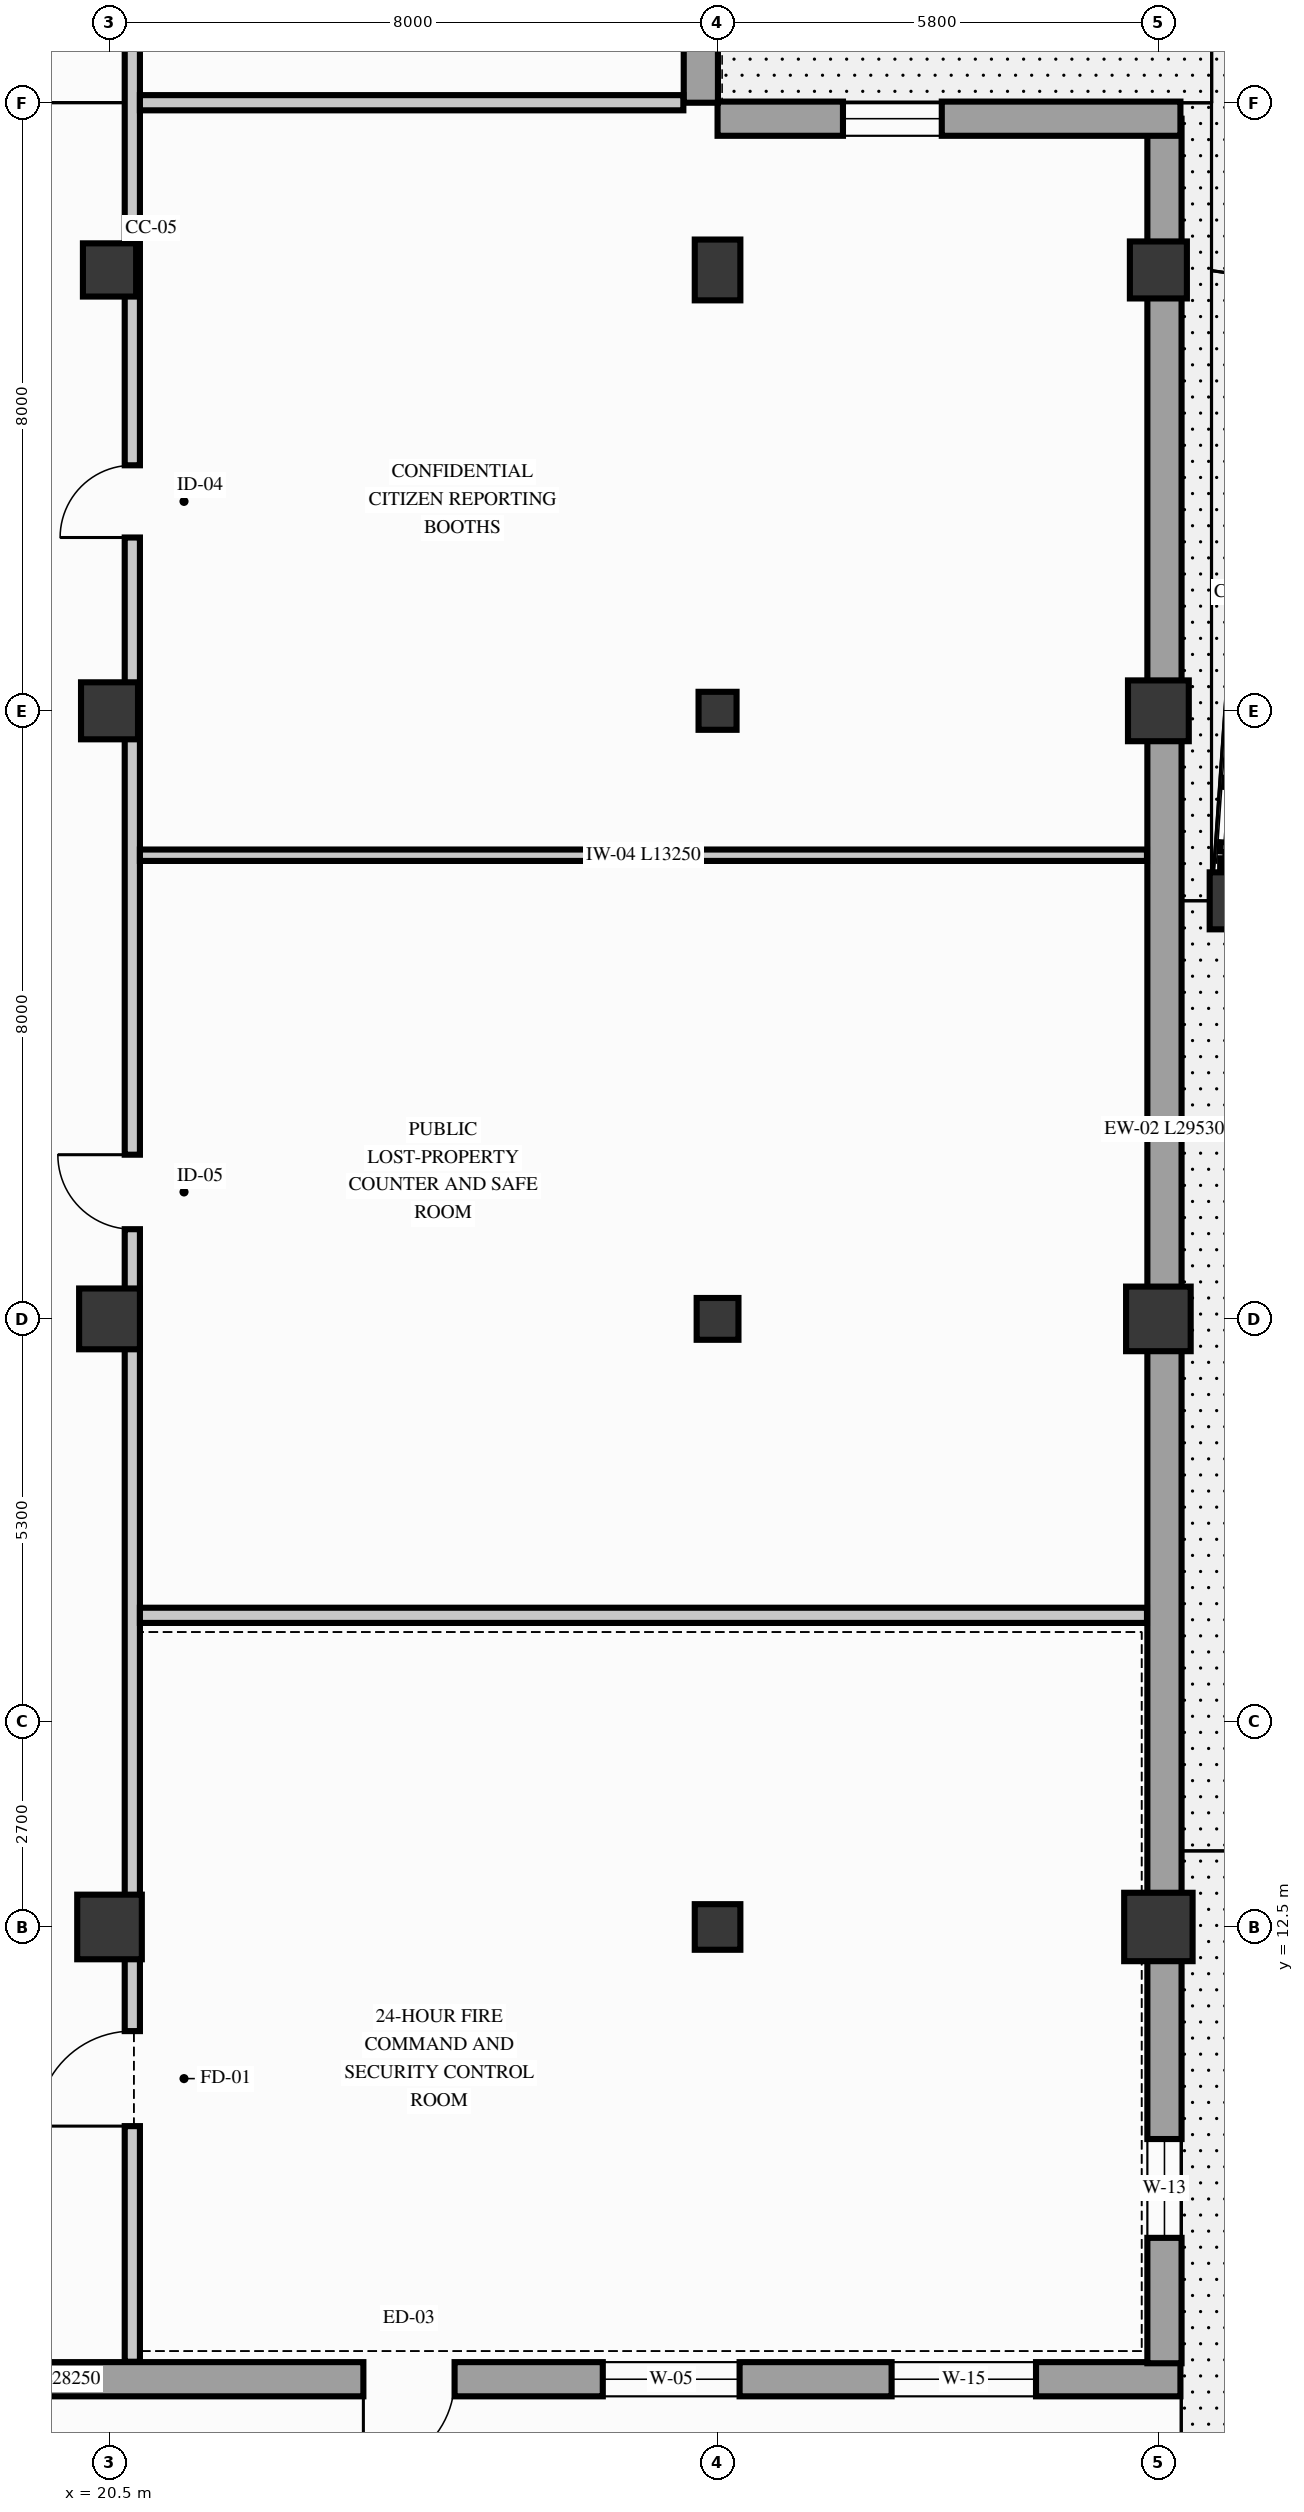
"""IFC4 building model, lengths in metres.
Left out: names, types, materials, properties, quantities, classifications, styles, units other than length and angle.
Written with IfcOpenShell. Run it as: python <this file> out.ifc"""

import sys

from ifc_helpers import new_model, si_unit, direction, frame, frame_2d, origin, origin_2d, place, context, subcontext, project, spatial, rectangle, extrude, element, fill, save


model = new_model("IFC4")
c1 = context("Model", 3, precision=1e-05, world=origin(), true_north=direction((0.0, 1.0)))
c2 = subcontext(c1, "Body", "Model", "MODEL_VIEW")
j1 = project(units=[si_unit("LENGTHUNIT", "METRE"), si_unit("PLANEANGLEUNIT", "RADIAN")], contexts=[c1])
p1 = place(None, origin())
s1 = spatial("IfcSite", under=j1, at=p1, CompositionType="ELEMENT")
p2 = place(p1, origin())
s2 = spatial("IfcBuilding", under=s1, at=p2, CompositionType="ELEMENT")
p3 = place(p2, origin())
s3 = spatial("IfcBuildingStorey", under=s2, at=p3, CompositionType="ELEMENT", Elevation=0.0)
p4 = place(p3, frame((35.35, 26.0, 0.0), z_axis=(0.0, 0.0, 1.0), x_axis=(0.0, 1.0, 0.0)))
e1 = element("IfcColumn", 1, at=p4, inside=s3, PredefinedType="COLUMN", context=c2, shape_type="SweptSolid", body=[
    extrude(rectangle(XDim=0.75, YDim=0.75, at=origin_2d()), origin(), (0.0, 0.0, 1.0), 5.1),
])
p5 = place(p3, frame((20.5, 12.5, 0.0), z_axis=(0.0, 0.0, 1.0), x_axis=(1.0, 0.0, 0.0)))
e2 = element("IfcColumn", 2, at=p5, inside=s3, PredefinedType="COLUMN", context=c2, shape_type="SweptSolid", body=[
    extrude(rectangle(XDim=0.85, YDim=0.85, at=origin_2d()), origin(), (0.0, 0.0, 1.0), 5.1),
])
p6 = place(p3, frame((20.5, 20.5, 0.0), z_axis=(0.0, 0.0, 1.0), x_axis=(1.0, 0.0, 0.0)))
e3 = element("IfcColumn", 3, at=p6, inside=s3, PredefinedType="COLUMN", context=c2, shape_type="SweptSolid", body=[
    extrude(rectangle(XDim=0.8, YDim=0.8, at=origin_2d()), origin(), (0.0, 0.0, 1.0), 5.1),
])
p7 = place(p3, frame((20.5, 28.5, 0.0), z_axis=(0.0, 0.0, 1.0), x_axis=(1.0, 0.0, 0.0)))
e4 = element("IfcColumn", 4, at=p7, inside=s3, PredefinedType="COLUMN", context=c2, shape_type="SweptSolid", body=[
    extrude(rectangle(XDim=0.75, YDim=0.75, at=origin_2d()), origin(), (0.0, 0.0, 1.0), 5.1),
])
p8 = place(p3, frame((20.5, 34.3, 0.0), z_axis=(0.0, 0.0, 1.0), x_axis=(1.0, 0.0, 0.0)))
e5 = element("IfcColumn", 5, at=p8, inside=s3, PredefinedType="COLUMN", context=c2, shape_type="SweptSolid", body=[
    extrude(rectangle(XDim=0.7, YDim=0.7, at=origin_2d()), origin(), (0.0, 0.0, 1.0), 5.1),
])
p9 = place(p3, frame((28.5, 12.5, 0.0), z_axis=(0.0, 0.0, 1.0), x_axis=(1.0, 0.0, 0.0)))
e6 = element("IfcColumn", 6, at=p9, inside=s3, PredefinedType="COLUMN", context=c2, shape_type="SweptSolid", body=[
    extrude(rectangle(XDim=0.6, YDim=0.6, at=origin_2d()), origin(), (0.0, 0.0, 1.0), 5.1),
])
p10 = place(p3, frame((28.5, 20.5, 0.0), z_axis=(0.0, 0.0, 1.0), x_axis=(1.0, 0.0, 0.0)))
e7 = element("IfcColumn", 7, at=p10, inside=s3, PredefinedType="COLUMN", context=c2, shape_type="SweptSolid", body=[
    extrude(rectangle(XDim=0.55, YDim=0.55, at=origin_2d()), origin(), (0.0, 0.0, 1.0), 5.1),
])
p11 = place(p3, frame((28.5, 28.5, 0.0), z_axis=(0.0, 0.0, 1.0), x_axis=(1.0, 0.0, 0.0)))
e8 = element("IfcColumn", 8, at=p11, inside=s3, PredefinedType="COLUMN", context=c2, shape_type="SweptSolid", body=[
    extrude(rectangle(XDim=0.5, YDim=0.5, at=origin_2d()), origin(), (0.0, 0.0, 1.0), 5.1),
])
p12 = place(p3, frame((28.5, 34.3, 0.0), z_axis=(0.0, 0.0, 1.0), x_axis=(1.0, 0.0, 0.0)))
e9 = element("IfcColumn", 9, at=p12, inside=s3, PredefinedType="COLUMN", context=c2, shape_type="SweptSolid", body=[
    extrude(rectangle(XDim=0.6, YDim=0.8, at=origin_2d()), origin(), (0.0, 0.0, 1.0), 5.1),
])
p13 = place(p3, frame((34.3, 12.5, 0.0), z_axis=(0.0, 0.0, 1.0), x_axis=(1.0, 0.0, 0.0)))
e10 = element("IfcColumn", 10, at=p13, inside=s3, PredefinedType="COLUMN", context=c2, shape_type="SweptSolid", body=[
    extrude(rectangle(XDim=0.9, YDim=0.9, at=origin_2d()), origin(), (0.0, 0.0, 1.0), 5.1),
])
p14 = place(p3, frame((34.3, 20.5, 0.0), z_axis=(0.0, 0.0, 1.0), x_axis=(1.0, 0.0, 0.0)))
e11 = element("IfcColumn", 11, at=p14, inside=s3, PredefinedType="COLUMN", context=c2, shape_type="SweptSolid", body=[
    extrude(rectangle(XDim=0.85, YDim=0.85, at=origin_2d()), origin(), (0.0, 0.0, 1.0), 5.1),
])
p15 = place(p3, frame((34.3, 28.5, 0.0), z_axis=(0.0, 0.0, 1.0), x_axis=(1.0, 0.0, 0.0)))
e12 = element("IfcColumn", 12, at=p15, inside=s3, PredefinedType="COLUMN", context=c2, shape_type="SweptSolid", body=[
    extrude(rectangle(XDim=0.8, YDim=0.8, at=origin_2d()), origin(), (0.0, 0.0, 1.0), 5.1),
])
p16 = place(p3, frame((34.3, 34.3, 0.0), z_axis=(0.0, 0.0, 1.0), x_axis=(1.0, 0.0, 0.0)))
e13 = element("IfcColumn", 13, at=p16, inside=s3, PredefinedType="COLUMN", context=c2, shape_type="SweptSolid", body=[
    extrude(rectangle(XDim=0.75, YDim=0.75, at=origin_2d()), origin(), (0.0, 0.0, 1.0), 5.1),
])
p17 = place(p3, frame((6.34, 6.55, 0.0), z_axis=(0.0, 0.0, 1.0), x_axis=(1.0, 0.0, 0.0)))
e14 = element("IfcWall", 14, at=p17, inside=s3, PredefinedType="SOLIDWALL", context=c2, shape_type="SweptSolid", body=[
    extrude(rectangle(XDim=28.25, YDim=0.45, at=frame_2d((14.125, 0.0))), origin(), (0.0, 0.0, 1.0), 4.428),
])
p18 = place(p17, frame((9.0, 0.0, 0.0), z_axis=(0.0, 0.0, 1.0), x_axis=(-1.0, 0.0, 0.0)))
e15 = element("IfcOpeningElement", 15, at=p18, cuts=e14, PredefinedType="OPENING", context=c2, shape_type="SweptSolid", body=[
    extrude(rectangle(XDim=2.0, YDim=2.5, at=frame_2d((1.0, 1.25))), frame((0.0, 0.235, 0.0), z_axis=(0.0, -1.0, 0.0), x_axis=(1.0, 0.0, 0.0)), (0.0, 0.0, 1.0), 0.47),
])
p19 = place(p17, frame((18.7, 0.0, 0.0), z_axis=(0.0, 0.0, 1.0), x_axis=(-1.0, 0.0, 0.0)))
e16 = element("IfcOpeningElement", 16, at=p19, cuts=e14, PredefinedType="OPENING", context=c2, shape_type="SweptSolid", body=[
    extrude(rectangle(XDim=1.2, YDim=2.3, at=frame_2d((0.6, 1.15))), frame((0.0, 0.235, 0.0), z_axis=(0.0, -1.0, 0.0), x_axis=(1.0, 0.0, 0.0)), (0.0, 0.0, 1.0), 0.47),
])
p20 = place(p17, frame((1.65, 0.0, 0.85)))
e17 = element("IfcOpeningElement", 17, at=p20, cuts=e14, PredefinedType="OPENING", context=c2, shape_type="SweptSolid", body=[
    extrude(rectangle(XDim=1.3, YDim=2.15, at=frame_2d((0.65, 1.075))), frame((0.0, 0.235, 0.0), z_axis=(0.0, -1.0, 0.0), x_axis=(1.0, 0.0, 0.0)), (0.0, 0.0, 1.0), 0.47),
])
p21 = place(p17, frame((20.65, 0.0, 0.85)))
e18 = element("IfcOpeningElement", 18, at=p21, cuts=e14, PredefinedType="OPENING", context=c2, shape_type="SweptSolid", body=[
    extrude(rectangle(XDim=1.8, YDim=2.4, at=frame_2d((0.9, 1.2))), frame((0.0, 0.235, 0.0), z_axis=(0.0, -1.0, 0.0), x_axis=(1.0, 0.0, 0.0)), (0.0, 0.0, 1.0), 0.47),
])
p22 = place(p17, frame((24.45, 0.0, 0.85)))
e19 = element("IfcOpeningElement", 19, at=p22, cuts=e14, PredefinedType="OPENING", context=c2, shape_type="SweptSolid", body=[
    extrude(rectangle(XDim=1.9, YDim=2.45, at=frame_2d((0.95, 1.225))), frame((0.0, 0.235, 0.0), z_axis=(0.0, -1.0, 0.0), x_axis=(1.0, 0.0, 0.0)), (0.0, 0.0, 1.0), 0.47),
])
p23 = place(p3, frame((34.38, 6.76, 0.0), z_axis=(0.0, 0.0, 1.0), x_axis=(0.0, 1.0, 0.0)))
e20 = element("IfcWall", 20, at=p23, inside=s3, PredefinedType="SOLIDWALL", context=c2, shape_type="SweptSolid", body=[
    extrude(rectangle(XDim=29.53, YDim=0.45, at=frame_2d((14.765, 0.0))), origin(), (0.0, 0.0, 1.0), 4.56),
])
p24 = place(p23, frame((1.65, 0.0, 0.85)))
e21 = element("IfcOpeningElement", 21, at=p24, cuts=e20, PredefinedType="OPENING", context=c2, shape_type="SweptSolid", body=[
    extrude(rectangle(XDim=1.3, YDim=2.15, at=frame_2d((0.65, 1.075))), frame((0.0, 0.235, 0.0), z_axis=(0.0, -1.0, 0.0), x_axis=(1.0, 0.0, 0.0)), (0.0, 0.0, 1.0), 0.47),
])
p25 = place(p3, frame((28.5, 36.29, 0.0), z_axis=(0.0, 0.0, 1.0), x_axis=(1.0, 0.0, 0.0)))
e22 = element("IfcWall", 22, at=p25, inside=s3, PredefinedType="SOLIDWALL", context=c2, shape_type="SweptSolid", body=[
    extrude(rectangle(XDim=6.09, YDim=0.45, at=frame_2d((3.045, 0.0))), origin(), (0.0, 0.0, 1.0), 4.88),
])
p26 = place(p25, frame((1.65, 0.0, 0.85)))
e23 = element("IfcOpeningElement", 23, at=p26, cuts=e22, PredefinedType="OPENING", context=c2, shape_type="SweptSolid", body=[
    extrude(rectangle(XDim=1.3, YDim=2.15, at=frame_2d((0.65, 1.075))), frame((0.0, 0.235, 0.0), z_axis=(0.0, -1.0, 0.0), x_axis=(1.0, 0.0, 0.0)), (0.0, 0.0, 1.0), 0.47),
])
p27 = place(p3, frame((28.28, 36.5, 0.0), z_axis=(0.0, 0.0, 1.0), x_axis=(0.0, 1.0, 0.0)))
e24 = element("IfcWall", 24, at=p27, inside=s3, PredefinedType="SOLIDWALL", context=c2, shape_type="SweptSolid", body=[
    extrude(rectangle(XDim=47.0, YDim=0.45, at=frame_2d((23.5, 0.0))), origin(), (0.0, 0.0, 1.0), 4.52),
])
p28 = place(p27, frame((27.0, 0.0, 0.0), z_axis=(0.0, 0.0, 1.0), x_axis=(-1.0, 0.0, 0.0)))
e25 = element("IfcOpeningElement", 25, at=p28, cuts=e24, PredefinedType="OPENING", context=c2, shape_type="SweptSolid", body=[
    extrude(rectangle(XDim=1.8, YDim=2.4, at=frame_2d((0.9, 1.2))), frame((0.0, 0.235, 0.0), z_axis=(0.0, -1.0, 0.0), x_axis=(1.0, 0.0, 0.0)), (0.0, 0.0, 1.0), 0.47),
])
p29 = place(p27, frame((1.65, 0.0, 0.85)))
e26 = element("IfcOpeningElement", 26, at=p29, cuts=e24, PredefinedType="OPENING", context=c2, shape_type="SweptSolid", body=[
    extrude(rectangle(XDim=1.6, YDim=2.4, at=frame_2d((0.8, 1.2))), frame((0.0, 0.235, 0.0), z_axis=(0.0, -1.0, 0.0), x_axis=(1.0, 0.0, 0.0)), (0.0, 0.0, 1.0), 0.47),
])
p30 = place(p27, frame((9.85, 0.0, 0.85)))
e27 = element("IfcOpeningElement", 27, at=p30, cuts=e24, PredefinedType="OPENING", context=c2, shape_type="SweptSolid", body=[
    extrude(rectangle(XDim=1.5, YDim=2.3, at=frame_2d((0.75, 1.15))), frame((0.0, 0.235, 0.0), z_axis=(0.0, -1.0, 0.0), x_axis=(1.0, 0.0, 0.0)), (0.0, 0.0, 1.0), 0.47),
])
p31 = place(p27, frame((34.45, 0.0, 0.85)))
e28 = element("IfcOpeningElement", 28, at=p31, cuts=e24, PredefinedType="OPENING", context=c2, shape_type="SweptSolid", body=[
    extrude(rectangle(XDim=1.5, YDim=2.3, at=frame_2d((0.75, 1.15))), frame((0.0, 0.235, 0.0), z_axis=(0.0, -1.0, 0.0), x_axis=(1.0, 0.0, 0.0)), (0.0, 0.0, 1.0), 0.47),
])
p32 = place(p27, frame((42.65, 0.0, 0.85)))
e29 = element("IfcOpeningElement", 29, at=p32, cuts=e24, PredefinedType="OPENING", context=c2, shape_type="SweptSolid", body=[
    extrude(rectangle(XDim=2.2, YDim=2.6, at=frame_2d((1.1, 1.3))), frame((0.0, 0.235, 0.0), z_axis=(0.0, -1.0, 0.0), x_axis=(1.0, 0.0, 0.0)), (0.0, 0.0, 1.0), 0.47),
])
p33 = place(p3, frame((20.8, 6.78, 0.0), z_axis=(0.0, 0.0, 1.0), x_axis=(0.0, 1.0, 0.0)))
e30 = element("IfcWall", 30, at=p33, inside=s3, PredefinedType="PARTITIONING", context=c2, shape_type="SweptSolid", body=[
    extrude(rectangle(XDim=68.17, YDim=0.2, at=frame_2d((34.085, 0.0))), origin(), (0.0, 0.0, 1.0), 4.368),
])
p34 = place(p33, frame((3.1, 0.0, 0.0)))
e31 = element("IfcOpeningElement", 31, at=p34, cuts=e30, PredefinedType="OPENING", context=c2, shape_type="SweptSolid", body=[
    extrude(rectangle(XDim=1.25, YDim=2.2, at=frame_2d((0.625, 1.1))), frame((0.0, 0.11, 0.0), z_axis=(0.0, -1.0, 0.0), x_axis=(1.0, 0.0, 0.0)), (0.0, 0.0, 1.0), 0.22),
])
p35 = place(p33, frame((14.9, 0.0, 0.0)))
e32 = element("IfcOpeningElement", 32, at=p35, cuts=e30, PredefinedType="OPENING", context=c2, shape_type="SweptSolid", body=[
    extrude(rectangle(XDim=0.98, YDim=2.16, at=frame_2d((0.49, 1.08))), frame((0.0, 0.11, 0.0), z_axis=(0.0, -1.0, 0.0), x_axis=(1.0, 0.0, 0.0)), (0.0, 0.0, 1.0), 0.22),
])
p36 = place(p33, frame((24.0, 0.0, 0.0)))
e33 = element("IfcOpeningElement", 33, at=p36, cuts=e30, PredefinedType="OPENING", context=c2, shape_type="SweptSolid", body=[
    extrude(rectangle(XDim=0.95, YDim=2.15, at=frame_2d((0.475, 1.075))), frame((0.0, 0.11, 0.0), z_axis=(0.0, -1.0, 0.0), x_axis=(1.0, 0.0, 0.0)), (0.0, 0.0, 1.0), 0.22),
])
p37 = place(p33, frame((38.9, 0.0, 0.0)))
e34 = element("IfcOpeningElement", 34, at=p37, cuts=e30, PredefinedType="OPENING", context=c2, shape_type="SweptSolid", body=[
    extrude(rectangle(XDim=0.95, YDim=2.15, at=frame_2d((0.475, 1.075))), frame((0.0, 0.11, 0.0), z_axis=(0.0, -1.0, 0.0), x_axis=(1.0, 0.0, 0.0)), (0.0, 0.0, 1.0), 0.22),
])
p38 = place(p33, frame((56.0, 0.0, 0.0)))
e35 = element("IfcOpeningElement", 35, at=p38, cuts=e30, PredefinedType="OPENING", context=c2, shape_type="SweptSolid", body=[
    extrude(rectangle(XDim=1.68, YDim=2.34, at=frame_2d((0.84, 1.17))), frame((0.0, 0.11, 0.0), z_axis=(0.0, -1.0, 0.0), x_axis=(1.0, 0.0, 0.0)), (0.0, 0.0, 1.0), 0.22),
])
p39 = place(p3, frame((20.9, 16.6, 0.0), z_axis=(0.0, 0.0, 1.0), x_axis=(1.0, 0.0, 0.0)))
e36 = element("IfcWall", 36, at=p39, inside=s3, PredefinedType="PARTITIONING", context=c2, shape_type="SweptSolid", body=[
    extrude(rectangle(XDim=13.25, YDim=0.2, at=frame_2d((6.625, 0.0))), origin(), (0.0, 0.0, 1.0), 4.428),
])
p40 = place(p3, frame((20.9, 26.6, 0.0), z_axis=(0.0, 0.0, 1.0), x_axis=(1.0, 0.0, 0.0)))
e37 = element("IfcWall", 37, at=p40, inside=s3, PredefinedType="PARTITIONING", context=c2, shape_type="SweptSolid", body=[
    extrude(rectangle(XDim=13.25, YDim=0.15, at=frame_2d((6.625, 0.0))), origin(), (0.0, 0.0, 1.0), 4.428),
])
p41 = place(p3, frame((20.9, 36.5, 0.0), z_axis=(0.0, 0.0, 1.0), x_axis=(1.0, 0.0, 0.0)))
e38 = element("IfcWall", 38, at=p41, inside=s3, PredefinedType="PARTITIONING", context=c2, shape_type="SweptSolid", body=[
    extrude(rectangle(XDim=7.15, YDim=0.2, at=frame_2d((3.575, 0.0))), origin(), (0.0, 0.0, 1.0), 4.86),
])
p42 = place(p19, origin())
e39 = element("IfcDoor", 39, at=p42, inside=s3, OperationType="SINGLE_SWING_RIGHT", PredefinedType="DOOR", context=c2, shape_type="SweptSolid", body=[
    extrude(rectangle(XDim=1.2, YDim=2.3, at=frame_2d((0.6, 1.15))), frame((0.0, 0.025, 0.0), z_axis=(0.0, -1.0, 0.0), x_axis=(1.0, 0.0, 0.0)), (0.0, 0.0, 1.0), 0.05),
])
fill(e16, e39)
p43 = place(p21, origin())
e40 = element("IfcWindow", 40, at=p43, inside=s3, PartitioningType="SINGLE_PANEL", PredefinedType="WINDOW", context=c2, shape_type="SweptSolid", body=[
    extrude(rectangle(XDim=1.8, YDim=2.4, at=frame_2d((0.9, 1.2))), frame((0.0, 0.03, 0.0), z_axis=(0.0, -1.0, 0.0), x_axis=(1.0, 0.0, 0.0)), (0.0, 0.0, 1.0), 0.06),
])
fill(e18, e40)
p44 = place(p22, origin())
e41 = element("IfcWindow", 41, at=p44, inside=s3, PartitioningType="SINGLE_PANEL", PredefinedType="WINDOW", context=c2, shape_type="SweptSolid", body=[
    extrude(rectangle(XDim=1.9, YDim=2.45, at=frame_2d((0.95, 1.225))), frame((0.0, 0.03, 0.0), z_axis=(0.0, -1.0, 0.0), x_axis=(1.0, 0.0, 0.0)), (0.0, 0.0, 1.0), 0.06),
])
fill(e19, e41)
p45 = place(p24, origin())
e42 = element("IfcWindow", 42, at=p45, inside=s3, PartitioningType="SINGLE_PANEL", PredefinedType="WINDOW", context=c2, shape_type="SweptSolid", body=[
    extrude(rectangle(XDim=1.3, YDim=2.15, at=frame_2d((0.65, 1.075))), frame((0.0, 0.03, 0.0), z_axis=(0.0, -1.0, 0.0), x_axis=(1.0, 0.0, 0.0)), (0.0, 0.0, 1.0), 0.06),
])
fill(e21, e42)
p46 = place(p26, origin())
e43 = element("IfcWindow", 43, at=p46, inside=s3, PartitioningType="SINGLE_PANEL", PredefinedType="WINDOW", context=c2, shape_type="SweptSolid", body=[
    extrude(rectangle(XDim=1.3, YDim=2.15, at=frame_2d((0.65, 1.075))), frame((0.0, 0.03, 0.0), z_axis=(0.0, -1.0, 0.0), x_axis=(1.0, 0.0, 0.0)), (0.0, 0.0, 1.0), 0.06),
])
fill(e23, e43)
p47 = place(p34, origin())
e44 = element("IfcDoor", 44, at=p47, inside=s3, OperationType="SINGLE_SWING_LEFT", PredefinedType="DOOR", context=c2, shape_type="SweptSolid", body=[
    extrude(rectangle(XDim=1.25, YDim=2.2, at=frame_2d((0.625, 1.1))), frame((0.0, 0.025, 0.0), z_axis=(0.0, -1.0, 0.0), x_axis=(1.0, 0.0, 0.0)), (0.0, 0.0, 1.0), 0.05),
])
fill(e31, e44)
p48 = place(p35, origin())
e45 = element("IfcDoor", 45, at=p48, inside=s3, OperationType="SINGLE_SWING_RIGHT", PredefinedType="DOOR", context=c2, shape_type="SweptSolid", body=[
    extrude(rectangle(XDim=0.98, YDim=2.16, at=frame_2d((0.49, 1.08))), frame((0.0, 0.025, 0.0), z_axis=(0.0, -1.0, 0.0), x_axis=(1.0, 0.0, 0.0)), (0.0, 0.0, 1.0), 0.05),
])
fill(e32, e45)
p49 = place(p36, origin())
e46 = element("IfcDoor", 46, at=p49, inside=s3, OperationType="SINGLE_SWING_LEFT", PredefinedType="DOOR", context=c2, shape_type="SweptSolid", body=[
    extrude(rectangle(XDim=0.95, YDim=2.15, at=frame_2d((0.475, 1.075))), frame((0.0, 0.025, 0.0), z_axis=(0.0, -1.0, 0.0), x_axis=(1.0, 0.0, 0.0)), (0.0, 0.0, 1.0), 0.05),
])
fill(e33, e46)
save(model, sys.argv[1])
